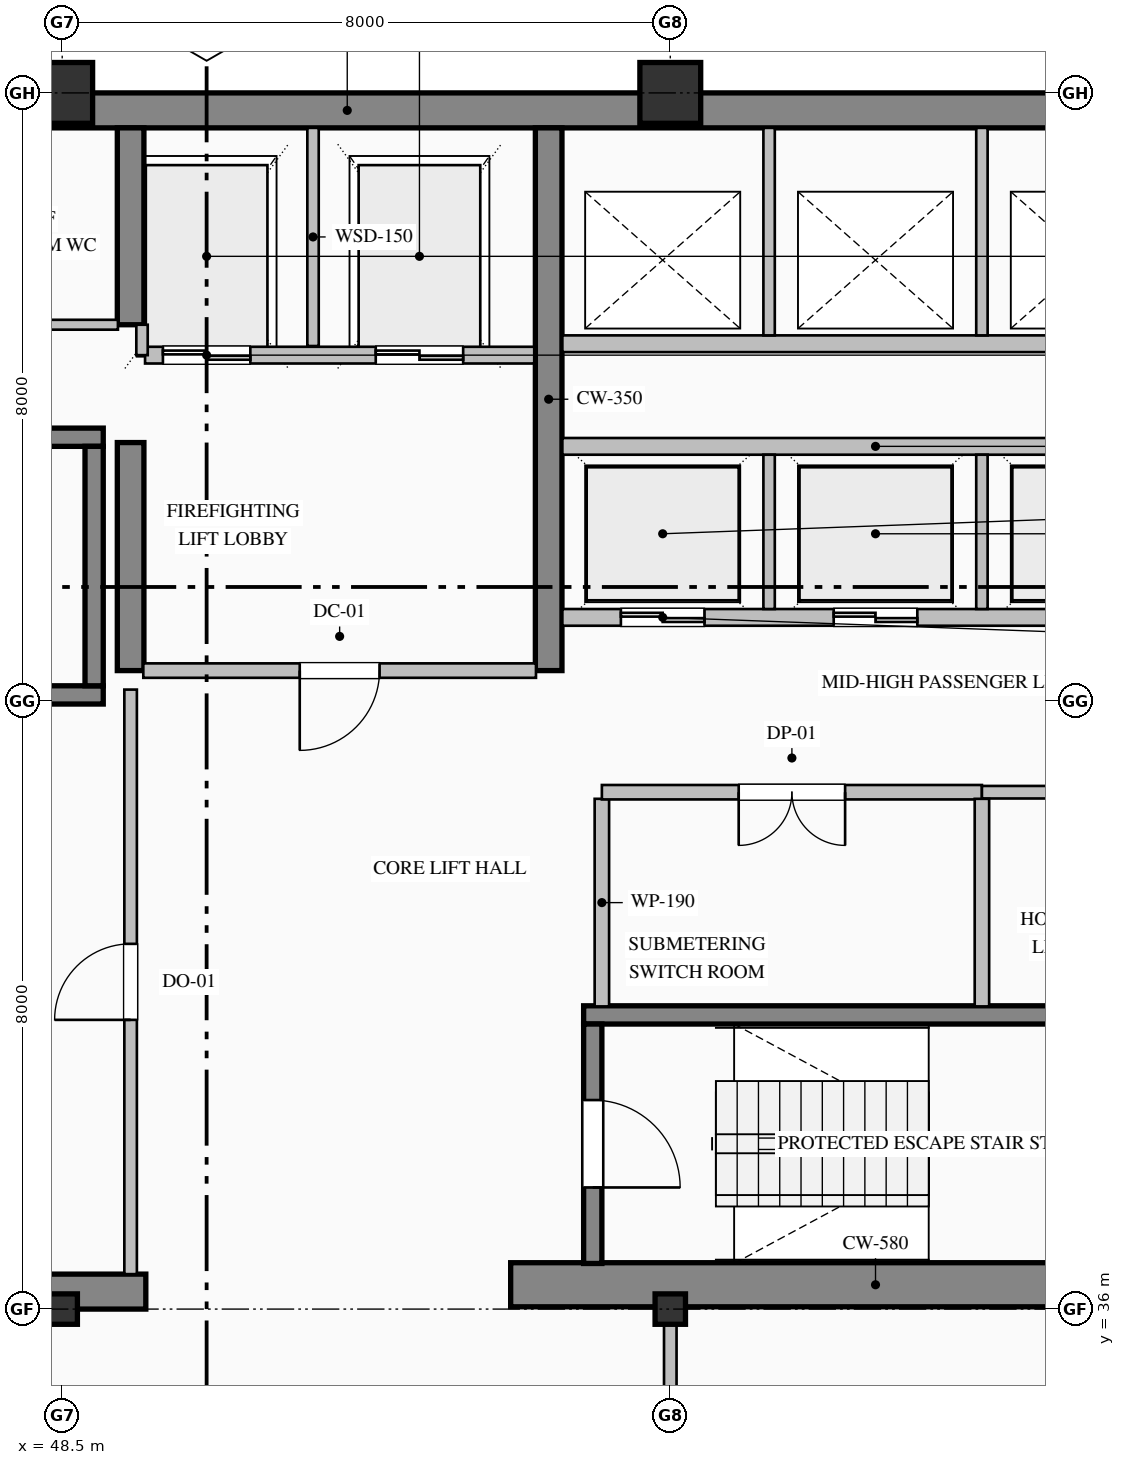
"""IFC4 building model, lengths in metres.
Left out: names, types, materials, properties, quantities, classifications, styles, units other than length and angle.
Written with IfcOpenShell. Run it as: python <this file> out.ifc"""

import sys

from ifc_helpers import new_model, si_unit, direction, frame, frame_2d, origin, origin_2d, place, context, subcontext, project, spatial, rectangle, hollow_rectangle, i_section, extrude, element, fill, save


model = new_model("IFC4")
c1 = context("Model", 3, precision=1e-05, world=origin(), true_north=direction((0.0, 1.0)))
c2 = subcontext(c1, "Body", "Model", "MODEL_VIEW")
j1 = project(units=[si_unit("LENGTHUNIT", "METRE"), si_unit("PLANEANGLEUNIT", "RADIAN")], contexts=[c1])
p1 = place(None, origin())
s1 = spatial("IfcSite", under=j1, at=p1, CompositionType="ELEMENT")
p2 = place(p1, origin())
s2 = spatial("IfcBuilding", under=s1, at=p2, CompositionType="ELEMENT")
p3 = place(p2, frame((0.0, 0.0, 277.8)))
s3 = spatial("IfcBuildingStorey", under=s2, at=p3, CompositionType="ELEMENT", Elevation=277.8)
p4 = place(p3, frame((40.5, 51.77, 0.0), z_axis=(0.0, 0.0, 1.0), x_axis=(1.0, 0.0, 0.0)))
e1 = element("IfcWall", 1, at=p4, inside=s3, PredefinedType="SHEAR", context=c2, shape_type="SweptSolid", body=[
    extrude(rectangle(XDim=23.5, YDim=0.46, at=frame_2d((11.75, 0.0))), origin(), (0.0, 0.0, 1.0), 3.65),
])
p5 = place(p3, frame((40.5, 36.23, 0.0), z_axis=(0.0, 0.0, 1.0), x_axis=(1.0, 0.0, 0.0)))
e2 = element("IfcWall", 2, at=p5, inside=s3, PredefinedType="SHEAR", context=c2, shape_type="SweptSolid", body=[
    extrude(rectangle(XDim=9.1, YDim=0.46, at=frame_2d((4.55, 0.0))), origin(), (0.0, 0.0, 1.0), 3.65),
])
p6 = place(p3, frame((54.4, 36.32, 0.0), z_axis=(0.0, 0.0, 1.0), x_axis=(1.0, 0.0, 0.0)))
e3 = element("IfcWall", 3, at=p6, inside=s3, PredefinedType="SHEAR", context=c2, shape_type="SweptSolid", body=[
    extrude(rectangle(XDim=9.6, YDim=0.58, at=frame_2d((4.8, 0.0))), origin(), (0.0, 0.0, 1.0), 4.0),
])
p7 = place(p3, frame((49.4, 44.4, 0.0), z_axis=(0.0, 0.0, 1.0), x_axis=(0.0, 1.0, 0.0)))
e4 = element("IfcWall", 4, at=p7, inside=s3, PredefinedType="SHEAR", context=c2, shape_type="SweptSolid", body=[
    extrude(rectangle(XDim=3.0, YDim=0.35, at=frame_2d((1.5, 0.0))), origin(), (0.0, 0.0, 1.0), 3.65),
])
p8 = place(p3, frame((49.4, 48.95, 0.0), z_axis=(0.0, 0.0, 1.0), x_axis=(0.0, 1.0, 0.0)))
e5 = element("IfcWall", 5, at=p8, inside=s3, PredefinedType="SHEAR", context=c2, shape_type="SweptSolid", body=[
    extrude(rectangle(XDim=2.59, YDim=0.35, at=frame_2d((1.295, 0.0))), origin(), (0.0, 0.0, 1.0), 3.65),
])
p9 = place(p3, frame((54.9, 44.4, 0.0), z_axis=(0.0, 0.0, 1.0), x_axis=(0.0, 1.0, 0.0)))
e6 = element("IfcWall", 6, at=p9, inside=s3, PredefinedType="SHEAR", context=c2, shape_type="SweptSolid", body=[
    extrude(rectangle(XDim=7.14, YDim=0.35, at=frame_2d((3.57, 0.0))), origin(), (0.0, 0.0, 1.0), 3.65),
])
p10 = place(p3, frame((48.5, 36.0, 0.0), z_axis=(0.0, 0.0, 1.0), x_axis=(1.0, 0.0, 0.0)))
e7 = element("IfcColumn", 7, at=p10, inside=s3, PredefinedType="COLUMN", context=c2, shape_type="SweptSolid", body=[
    extrude(i_section(OverallWidth=0.4, OverallDepth=0.4, WebThickness=0.013, FlangeThickness=0.021, FilletRadius=0.022, at=origin_2d()), origin(), (0.0, 0.0, 1.0), 4.0),
])
p11 = place(p3, frame((48.5, 52.0, 0.0), z_axis=(0.0, 0.0, 1.0), x_axis=(1.0, 0.0, 0.0)))
e8 = element("IfcColumn", 8, at=p11, inside=s3, PredefinedType="COLUMN", context=c2, shape_type="SweptSolid", body=[
    extrude(hollow_rectangle(XDim=0.8, YDim=0.8, WallThickness=0.032, at=origin_2d()), origin(), (0.0, 0.0, 1.0), 4.0),
])
p12 = place(p3, frame((56.5, 36.0, 0.0), z_axis=(0.0, 0.0, 1.0), x_axis=(1.0, 0.0, 0.0)))
e9 = element("IfcColumn", 9, at=p12, inside=s3, PredefinedType="COLUMN", context=c2, shape_type="SweptSolid", body=[
    extrude(i_section(OverallWidth=0.4, OverallDepth=0.4, WebThickness=0.013, FlangeThickness=0.021, FilletRadius=0.022, at=origin_2d()), origin(), (0.0, 0.0, 1.0), 4.0),
])
p13 = place(p3, frame((56.5, 52.0, 0.0), z_axis=(0.0, 0.0, 1.0), x_axis=(1.0, 0.0, 0.0)))
e10 = element("IfcColumn", 10, at=p13, inside=s3, PredefinedType="COLUMN", context=c2, shape_type="SweptSolid", body=[
    extrude(hollow_rectangle(XDim=0.8, YDim=0.8, WallThickness=0.032, at=origin_2d()), origin(), (0.0, 0.0, 1.0), 4.0),
])
for number, where, z_axis, x_axis in (
    (11, (40.96, 47.47, 0.0), (0.0, 0.0, 1.0), (1.0, 0.0, 0.0)),
    (12, (49.04, 44.08, 0.0), (0.0, 0.0, 1.0), (-1.0, 0.0, 0.0)),
):
    element("IfcWall", number, at=place(p3, frame(where, z_axis=z_axis, x_axis=x_axis)), inside=s3, PredefinedType="SOLIDWALL", context=c2, shape_type="SweptSolid", body=[
        extrude(rectangle(XDim=8.08, YDim=0.24, at=frame_2d((4.04, 0.0))), origin(), (0.0, 0.0, 1.0), 4.0),
    ])
p14 = place(p3, frame((48.92, 44.2, 0.0), z_axis=(0.0, 0.0, 1.0), x_axis=(0.0, 1.0, 0.0)))
e13 = element("IfcWall", 13, at=p14, inside=s3, PredefinedType="SOLIDWALL", context=c2, shape_type="SweptSolid", body=[
    extrude(rectangle(XDim=3.15, YDim=0.24, at=frame_2d((1.575, 0.0))), origin(), (0.0, 0.0, 1.0), 4.0),
])
p15 = place(p3, frame((55.36, 39.87, 0.0), z_axis=(0.0, 0.0, 1.0), x_axis=(1.0, 0.0, 0.0)))
e14 = element("IfcWall", 14, at=p15, inside=s3, PredefinedType="SOLIDWALL", context=c2, shape_type="SweptSolid", body=[
    extrude(rectangle(XDim=8.08, YDim=0.24, at=frame_2d((4.04, 0.0))), origin(), (0.0, 0.0, 1.0), 4.0),
])
p16 = place(p3, frame((55.48, 39.75, 0.0), z_axis=(0.0, 0.0, 1.0), x_axis=(0.0, -1.0, 0.0)))
e15 = element("IfcWall", 15, at=p16, inside=s3, PredefinedType="SOLIDWALL", context=c2, shape_type="SweptSolid", body=[
    extrude(rectangle(XDim=3.15, YDim=0.24, at=frame_2d((1.575, 0.0))), origin(), (0.0, 0.0, 1.0), 4.0),
])
p17 = place(p16, frame((1.0, 0.0, 0.0)))
e16 = element("IfcOpeningElement", 16, at=p17, cuts=e15, PredefinedType="OPENING", context=c2, shape_type="SweptSolid", body=[
    extrude(rectangle(XDim=1.15, YDim=2.2, at=frame_2d((0.575, 1.1))), frame((0.0, 0.13, 0.0), z_axis=(0.0, -1.0, 0.0), x_axis=(1.0, 0.0, 0.0)), (0.0, 0.0, 1.0), 0.26),
])
p18 = place(p3, frame((54.71, 48.55, 0.0), z_axis=(0.0, 0.0, 1.0), x_axis=(-1.0, 0.0, 0.0)))
e17 = element("IfcWall", 17, at=p18, inside=s3, PredefinedType="PARTITIONING", context=c2, shape_type="SweptSolid", body=[
    extrude(rectangle(XDim=5.12, YDim=0.22, at=frame_2d((2.56, 0.0))), origin(), (0.0, 0.0, 1.0), 3.65),
])
p19 = place(p18, frame((3.735, 0.0, 0.0)))
e18 = element("IfcOpeningElement", 18, at=p19, cuts=e17, PredefinedType="OPENING", context=c2, shape_type="SweptSolid", body=[
    extrude(rectangle(XDim=1.15, YDim=2.2, at=frame_2d((0.575, 1.1))), frame((0.0, 0.12, 0.0), z_axis=(0.0, -1.0, 0.0), x_axis=(1.0, 0.0, 0.0)), (0.0, 0.0, 1.0), 0.24),
])
p20 = place(p18, frame((0.935, 0.0, 0.0)))
e19 = element("IfcOpeningElement", 19, at=p20, cuts=e17, PredefinedType="OPENING", context=c2, shape_type="SweptSolid", body=[
    extrude(rectangle(XDim=1.15, YDim=2.2, at=frame_2d((0.575, 1.1))), frame((0.0, 0.12, 0.0), z_axis=(0.0, -1.0, 0.0), x_axis=(1.0, 0.0, 0.0)), (0.0, 0.0, 1.0), 0.24),
])
p21 = place(p3, frame((51.8, 48.67, 0.0), z_axis=(0.0, 0.0, 1.0), x_axis=(0.0, 1.0, 0.0)))
e20 = element("IfcWall", 20, at=p21, inside=s3, PredefinedType="PARTITIONING", context=c2, shape_type="SweptSolid", body=[
    extrude(rectangle(XDim=2.87, YDim=0.15, at=frame_2d((1.435, 0.0))), origin(), (0.0, 0.0, 1.0), 3.65),
])
p22 = place(p3, frame((49.55, 48.55, 0.0), z_axis=(0.0, 0.0, 1.0), x_axis=(0.0, 1.0, 0.0)))
e21 = element("IfcWall", 21, at=p22, inside=s3, PredefinedType="PARTITIONING", context=c2, shape_type="SweptSolid", body=[
    extrude(rectangle(XDim=0.4, YDim=0.15, at=frame_2d((0.2, 0.0))), origin(), (0.0, 0.0, 1.0), 3.65),
])
p23 = place(p3, frame((63.32, 45.1, 0.0), z_axis=(0.0, 0.0, 1.0), x_axis=(-1.0, 0.0, 0.0)))
e22 = element("IfcWall", 22, at=p23, inside=s3, PredefinedType="PARTITIONING", context=c2, shape_type="SweptSolid", body=[
    extrude(rectangle(XDim=8.24, YDim=0.22, at=frame_2d((4.12, 0.0))), origin(), (0.0, 0.0, 1.0), 3.65),
])
p24 = place(p23, frame((6.37, 0.0, 0.0)))
e23 = element("IfcOpeningElement", 23, at=p24, cuts=e22, PredefinedType="OPENING", context=c2, shape_type="SweptSolid", body=[
    extrude(rectangle(XDim=1.1, YDim=2.2, at=frame_2d((0.55, 1.1))), frame((0.0, 0.12, 0.0), z_axis=(0.0, -1.0, 0.0), x_axis=(1.0, 0.0, 0.0)), (0.0, 0.0, 1.0), 0.24),
])
p25 = place(p23, frame((3.57, 0.0, 0.0)))
e24 = element("IfcOpeningElement", 24, at=p25, cuts=e22, PredefinedType="OPENING", context=c2, shape_type="SweptSolid", body=[
    extrude(rectangle(XDim=1.1, YDim=2.2, at=frame_2d((0.55, 1.1))), frame((0.0, 0.12, 0.0), z_axis=(0.0, -1.0, 0.0), x_axis=(1.0, 0.0, 0.0)), (0.0, 0.0, 1.0), 0.24),
])
p26 = place(p23, frame((0.77, 0.0, 0.0)))
e25 = element("IfcOpeningElement", 25, at=p26, cuts=e22, PredefinedType="OPENING", context=c2, shape_type="SweptSolid", body=[
    extrude(rectangle(XDim=1.1, YDim=2.2, at=frame_2d((0.55, 1.1))), frame((0.0, 0.12, 0.0), z_axis=(0.0, -1.0, 0.0), x_axis=(1.0, 0.0, 0.0)), (0.0, 0.0, 1.0), 0.24),
])
p27 = place(p3, frame((55.08, 47.35, 0.0), z_axis=(0.0, 0.0, 1.0), x_axis=(1.0, 0.0, 0.0)))
e26 = element("IfcWall", 26, at=p27, inside=s3, PredefinedType="PARTITIONING", context=c2, shape_type="SweptSolid", body=[
    extrude(rectangle(XDim=8.24, YDim=0.22, at=frame_2d((4.12, 0.0))), origin(), (0.0, 0.0, 1.0), 3.65),
])
for number, where, z_axis, x_axis in (
    (27, (57.8, 45.21, 0.0), (0.0, 0.0, 1.0), (0.0, 1.0, 0.0)),
    (28, (60.6, 45.21, 0.0), (0.0, 0.0, 1.0), (0.0, 1.0, 0.0)),
):
    element("IfcWall", number, at=place(p3, frame(where, z_axis=z_axis, x_axis=x_axis)), inside=s3, PredefinedType="PARTITIONING", context=c2, shape_type="SweptSolid", body=[
        extrude(rectangle(XDim=2.03, YDim=0.15, at=frame_2d((1.015, 0.0))), origin(), (0.0, 0.0, 1.0), 3.65),
    ])
p28 = place(p3, frame((63.32, 48.7, 0.0), z_axis=(0.0, 0.0, 1.0), x_axis=(-1.0, 0.0, 0.0)))
e29 = element("IfcWall", 29, at=p28, inside=s3, PredefinedType="PARTITIONING", context=c2, shape_type="SweptSolid", body=[
    extrude(rectangle(XDim=8.24, YDim=0.22, at=frame_2d((4.12, 0.0))), origin(), (0.0, 0.0, 1.0), 3.65),
])
for number, where, z_axis, x_axis in (
    (30, (57.8, 48.81, 0.0), (0.0, 0.0, 1.0), (0.0, 1.0, 0.0)),
    (31, (60.6, 48.81, 0.0), (0.0, 0.0, 1.0), (0.0, 1.0, 0.0)),
):
    element("IfcWall", number, at=place(p3, frame(where, z_axis=z_axis, x_axis=x_axis)), inside=s3, PredefinedType="PARTITIONING", context=c2, shape_type="SweptSolid", body=[
        extrude(rectangle(XDim=2.73, YDim=0.15, at=frame_2d((1.365, 0.0))), origin(), (0.0, 0.0, 1.0), 3.65),
    ])
p29 = place(p3, frame((43.5, 48.95, 0.0), z_axis=(0.0, 0.0, 1.0), x_axis=(1.0, 0.0, 0.0)))
e32 = element("IfcWall", 32, at=p29, inside=s3, PredefinedType="PARTITIONING", context=c2, shape_type="SweptSolid", body=[
    extrude(rectangle(XDim=5.733, YDim=0.13, at=frame_2d((2.866, 0.0))), origin(), (0.0, 0.0, 1.0), 3.65),
])
p30 = place(p29, frame((2.406, 0.0, 0.0)))
e33 = element("IfcOpeningElement", 33, at=p30, cuts=e32, PredefinedType="OPENING", context=c2, shape_type="SweptSolid", body=[
    extrude(rectangle(XDim=0.92, YDim=2.15, at=frame_2d((0.46, 1.075))), frame((0.0, 0.075, 0.0), z_axis=(0.0, -1.0, 0.0), x_axis=(1.0, 0.0, 0.0)), (0.0, 0.0, 1.0), 0.15),
])
p31 = place(p3, frame((54.733, 44.4, 0.0), z_axis=(0.0, 0.0, 1.0), x_axis=(-1.0, 0.0, 0.0)))
e34 = element("IfcWall", 34, at=p31, inside=s3, PredefinedType="PARTITIONING", context=c2, shape_type="SweptSolid", body=[
    extrude(rectangle(XDim=5.166, YDim=0.19, at=frame_2d((2.583, 0.0))), origin(), (0.0, 0.0, 1.0), 3.65),
])
p32 = place(p31, frame((2.058, 0.0, 0.0)))
e35 = element("IfcOpeningElement", 35, at=p32, cuts=e34, PredefinedType="OPENING", context=c2, shape_type="SweptSolid", body=[
    extrude(rectangle(XDim=1.05, YDim=2.15, at=frame_2d((0.525, 1.075))), frame((0.0, 0.105, 0.0), z_axis=(0.0, -1.0, 0.0), x_axis=(1.0, 0.0, 0.0)), (0.0, 0.0, 1.0), 0.21),
])
p33 = place(p3, frame((49.4, 36.46, 0.0), z_axis=(0.0, 0.0, 1.0), x_axis=(0.0, 1.0, 0.0)))
e36 = element("IfcWall", 36, at=p33, inside=s3, PredefinedType="PARTITIONING", context=c2, shape_type="SweptSolid", body=[
    extrude(rectangle(XDim=7.69, YDim=0.165, at=frame_2d((3.845, 0.0))), origin(), (0.0, 0.0, 1.0), 2.892),
])
p34 = place(p33, frame((3.345, 0.0, 0.0)))
e37 = element("IfcOpeningElement", 37, at=p34, cuts=e36, PredefinedType="OPENING", context=c2, shape_type="SweptSolid", body=[
    extrude(rectangle(XDim=1.0, YDim=2.15, at=frame_2d((0.5, 1.075))), frame((0.0, 0.093, 0.0), z_axis=(0.0, -1.0, 0.0), x_axis=(1.0, 0.0, 0.0)), (0.0, 0.0, 1.0), 0.185),
])
p35 = place(p3, frame((55.6, 42.713, 0.0), z_axis=(0.0, 0.0, 1.0), x_axis=(0.0, -1.0, 0.0)))
e38 = element("IfcWall", 38, at=p35, inside=s3, PredefinedType="PARTITIONING", context=c2, shape_type="SweptSolid", body=[
    extrude(rectangle(XDim=2.731, YDim=0.19, at=frame_2d((1.365, 0.0))), origin(), (0.0, 0.0, 1.0), 3.65),
])
p36 = place(p3, frame((60.6, 42.8, 0.0), z_axis=(0.0, 0.0, 1.0), x_axis=(-1.0, 0.0, 0.0)))
e39 = element("IfcWall", 39, at=p36, inside=s3, PredefinedType="PARTITIONING", context=c2, shape_type="SweptSolid", body=[
    extrude(rectangle(XDim=5.0, YDim=0.19, at=frame_2d((2.5, 0.0))), origin(), (0.0, 0.0, 1.0), 3.65),
])
p37 = place(p36, frame((1.8, 0.0, 0.0)))
e40 = element("IfcOpeningElement", 40, at=p37, cuts=e39, PredefinedType="OPENING", context=c2, shape_type="SweptSolid", body=[
    extrude(rectangle(XDim=1.4, YDim=2.25, at=frame_2d((0.7, 1.125))), frame((0.0, 0.105, 0.0), z_axis=(0.0, -1.0, 0.0), x_axis=(1.0, 0.0, 0.0)), (0.0, 0.0, 1.0), 0.21),
])
p38 = place(p3, frame((63.54, 42.8, 0.0), z_axis=(0.0, 0.0, 1.0), x_axis=(-1.0, 0.0, 0.0)))
e41 = element("IfcWall", 41, at=p38, inside=s3, PredefinedType="PARTITIONING", context=c2, shape_type="SweptSolid", body=[
    extrude(rectangle(XDim=2.94, YDim=0.165, at=frame_2d((1.47, 0.0))), origin(), (0.0, 0.0, 1.0), 3.65),
])
p39 = place(p38, frame((1.02, 0.0, 0.0)))
e42 = element("IfcOpeningElement", 42, at=p39, cuts=e41, PredefinedType="OPENING", context=c2, shape_type="SweptSolid", body=[
    extrude(rectangle(XDim=0.9, YDim=2.15, at=frame_2d((0.45, 1.075))), frame((0.0, 0.093, 0.0), z_axis=(0.0, -1.0, 0.0), x_axis=(1.0, 0.0, 0.0)), (0.0, 0.0, 1.0), 0.185),
])
p40 = place(p3, frame((60.6, 42.713, 0.0), z_axis=(0.0, 0.0, 1.0), x_axis=(0.0, -1.0, 0.0)))
e43 = element("IfcWall", 43, at=p40, inside=s3, PredefinedType="PARTITIONING", context=c2, shape_type="SweptSolid", body=[
    extrude(rectangle(XDim=2.731, YDim=0.19, at=frame_2d((1.365, 0.0))), origin(), (0.0, 0.0, 1.0), 3.65),
])
p41 = place(p3, frame((56.5, 36.0, 0.0), z_axis=(0.0, 0.0, 1.0), x_axis=(0.0, -1.0, 0.0)))
e44 = element("IfcWall", 44, at=p41, inside=s3, PredefinedType="PARTITIONING", context=c2, shape_type="SweptSolid", body=[
    extrude(rectangle(XDim=4.113, YDim=0.165, at=frame_2d((2.057, 0.0))), origin(), (0.0, 0.0, 1.0), 3.054),
])
p42 = place(p41, frame((1.606, 0.0, 0.0)))
e45 = element("IfcOpeningElement", 45, at=p42, cuts=e44, PredefinedType="OPENING", context=c2, shape_type="SweptSolid", body=[
    extrude(rectangle(XDim=0.9, YDim=2.15, at=frame_2d((0.45, 1.075))), frame((0.0, 0.093, 0.0), z_axis=(0.0, -1.0, 0.0), x_axis=(1.0, 0.0, 0.0)), (0.0, 0.0, 1.0), 0.185),
])
p43 = place(p17, origin())
e46 = element("IfcDoor", 46, at=p43, inside=s3, OperationType="SINGLE_SWING_RIGHT", PredefinedType="DOOR", context=c2, shape_type="SweptSolid", body=[
    extrude(rectangle(XDim=1.15, YDim=2.2, at=frame_2d((0.575, 1.1))), frame((0.0, 0.025, 0.0), z_axis=(0.0, -1.0, 0.0), x_axis=(1.0, 0.0, 0.0)), (0.0, 0.0, 1.0), 0.05),
])
fill(e16, e46)
p44 = place(p19, origin())
e47 = element("IfcDoor", 47, at=p44, inside=s3, OperationType="DOUBLE_DOOR_SLIDING", PredefinedType="DOOR", context=c2, shape_type="SweptSolid", body=[
    extrude(rectangle(XDim=1.15, YDim=2.2, at=frame_2d((0.575, 1.1))), frame((0.0, 0.025, 0.0), z_axis=(0.0, -1.0, 0.0), x_axis=(1.0, 0.0, 0.0)), (0.0, 0.0, 1.0), 0.05),
])
fill(e18, e47)
p45 = place(p20, origin())
e48 = element("IfcDoor", 48, at=p45, inside=s3, OperationType="DOUBLE_DOOR_SLIDING", PredefinedType="DOOR", context=c2, shape_type="SweptSolid", body=[
    extrude(rectangle(XDim=1.15, YDim=2.2, at=frame_2d((0.575, 1.1))), frame((0.0, 0.025, 0.0), z_axis=(0.0, -1.0, 0.0), x_axis=(1.0, 0.0, 0.0)), (0.0, 0.0, 1.0), 0.05),
])
fill(e19, e48)
p46 = place(p24, origin())
e49 = element("IfcDoor", 49, at=p46, inside=s3, OperationType="DOUBLE_DOOR_SLIDING", PredefinedType="DOOR", context=c2, shape_type="SweptSolid", body=[
    extrude(rectangle(XDim=1.1, YDim=2.2, at=frame_2d((0.55, 1.1))), frame((0.0, 0.025, 0.0), z_axis=(0.0, -1.0, 0.0), x_axis=(1.0, 0.0, 0.0)), (0.0, 0.0, 1.0), 0.05),
])
fill(e23, e49)
p47 = place(p25, origin())
e50 = element("IfcDoor", 50, at=p47, inside=s3, OperationType="DOUBLE_DOOR_SLIDING", PredefinedType="DOOR", context=c2, shape_type="SweptSolid", body=[
    extrude(rectangle(XDim=1.1, YDim=2.2, at=frame_2d((0.55, 1.1))), frame((0.0, 0.025, 0.0), z_axis=(0.0, -1.0, 0.0), x_axis=(1.0, 0.0, 0.0)), (0.0, 0.0, 1.0), 0.05),
])
fill(e24, e50)
p48 = place(p32, origin())
e51 = element("IfcDoor", 51, at=p48, inside=s3, OperationType="SINGLE_SWING_RIGHT", PredefinedType="DOOR", context=c2, shape_type="SweptSolid", body=[
    extrude(rectangle(XDim=1.05, YDim=2.15, at=frame_2d((0.525, 1.075))), frame((0.0, 0.025, 0.0), z_axis=(0.0, -1.0, 0.0), x_axis=(1.0, 0.0, 0.0)), (0.0, 0.0, 1.0), 0.05),
])
fill(e35, e51)
p49 = place(p34, origin())
e52 = element("IfcDoor", 52, at=p49, inside=s3, OperationType="SINGLE_SWING_LEFT", PredefinedType="DOOR", context=c2, shape_type="SweptSolid", body=[
    extrude(rectangle(XDim=1.0, YDim=2.15, at=frame_2d((0.5, 1.075))), frame((0.0, 0.025, 0.0), z_axis=(0.0, -1.0, 0.0), x_axis=(1.0, 0.0, 0.0)), (0.0, 0.0, 1.0), 0.05),
])
fill(e37, e52)
p50 = place(p37, origin())
e53 = element("IfcDoor", 53, at=p50, inside=s3, OperationType="DOUBLE_DOOR_SINGLE_SWING", PredefinedType="DOOR", context=c2, shape_type="SweptSolid", body=[
    extrude(rectangle(XDim=1.4, YDim=2.25, at=frame_2d((0.7, 1.125))), frame((0.0, 0.025, 0.0), z_axis=(0.0, -1.0, 0.0), x_axis=(1.0, 0.0, 0.0)), (0.0, 0.0, 1.0), 0.05),
])
fill(e40, e53)
save(model, sys.argv[1])
